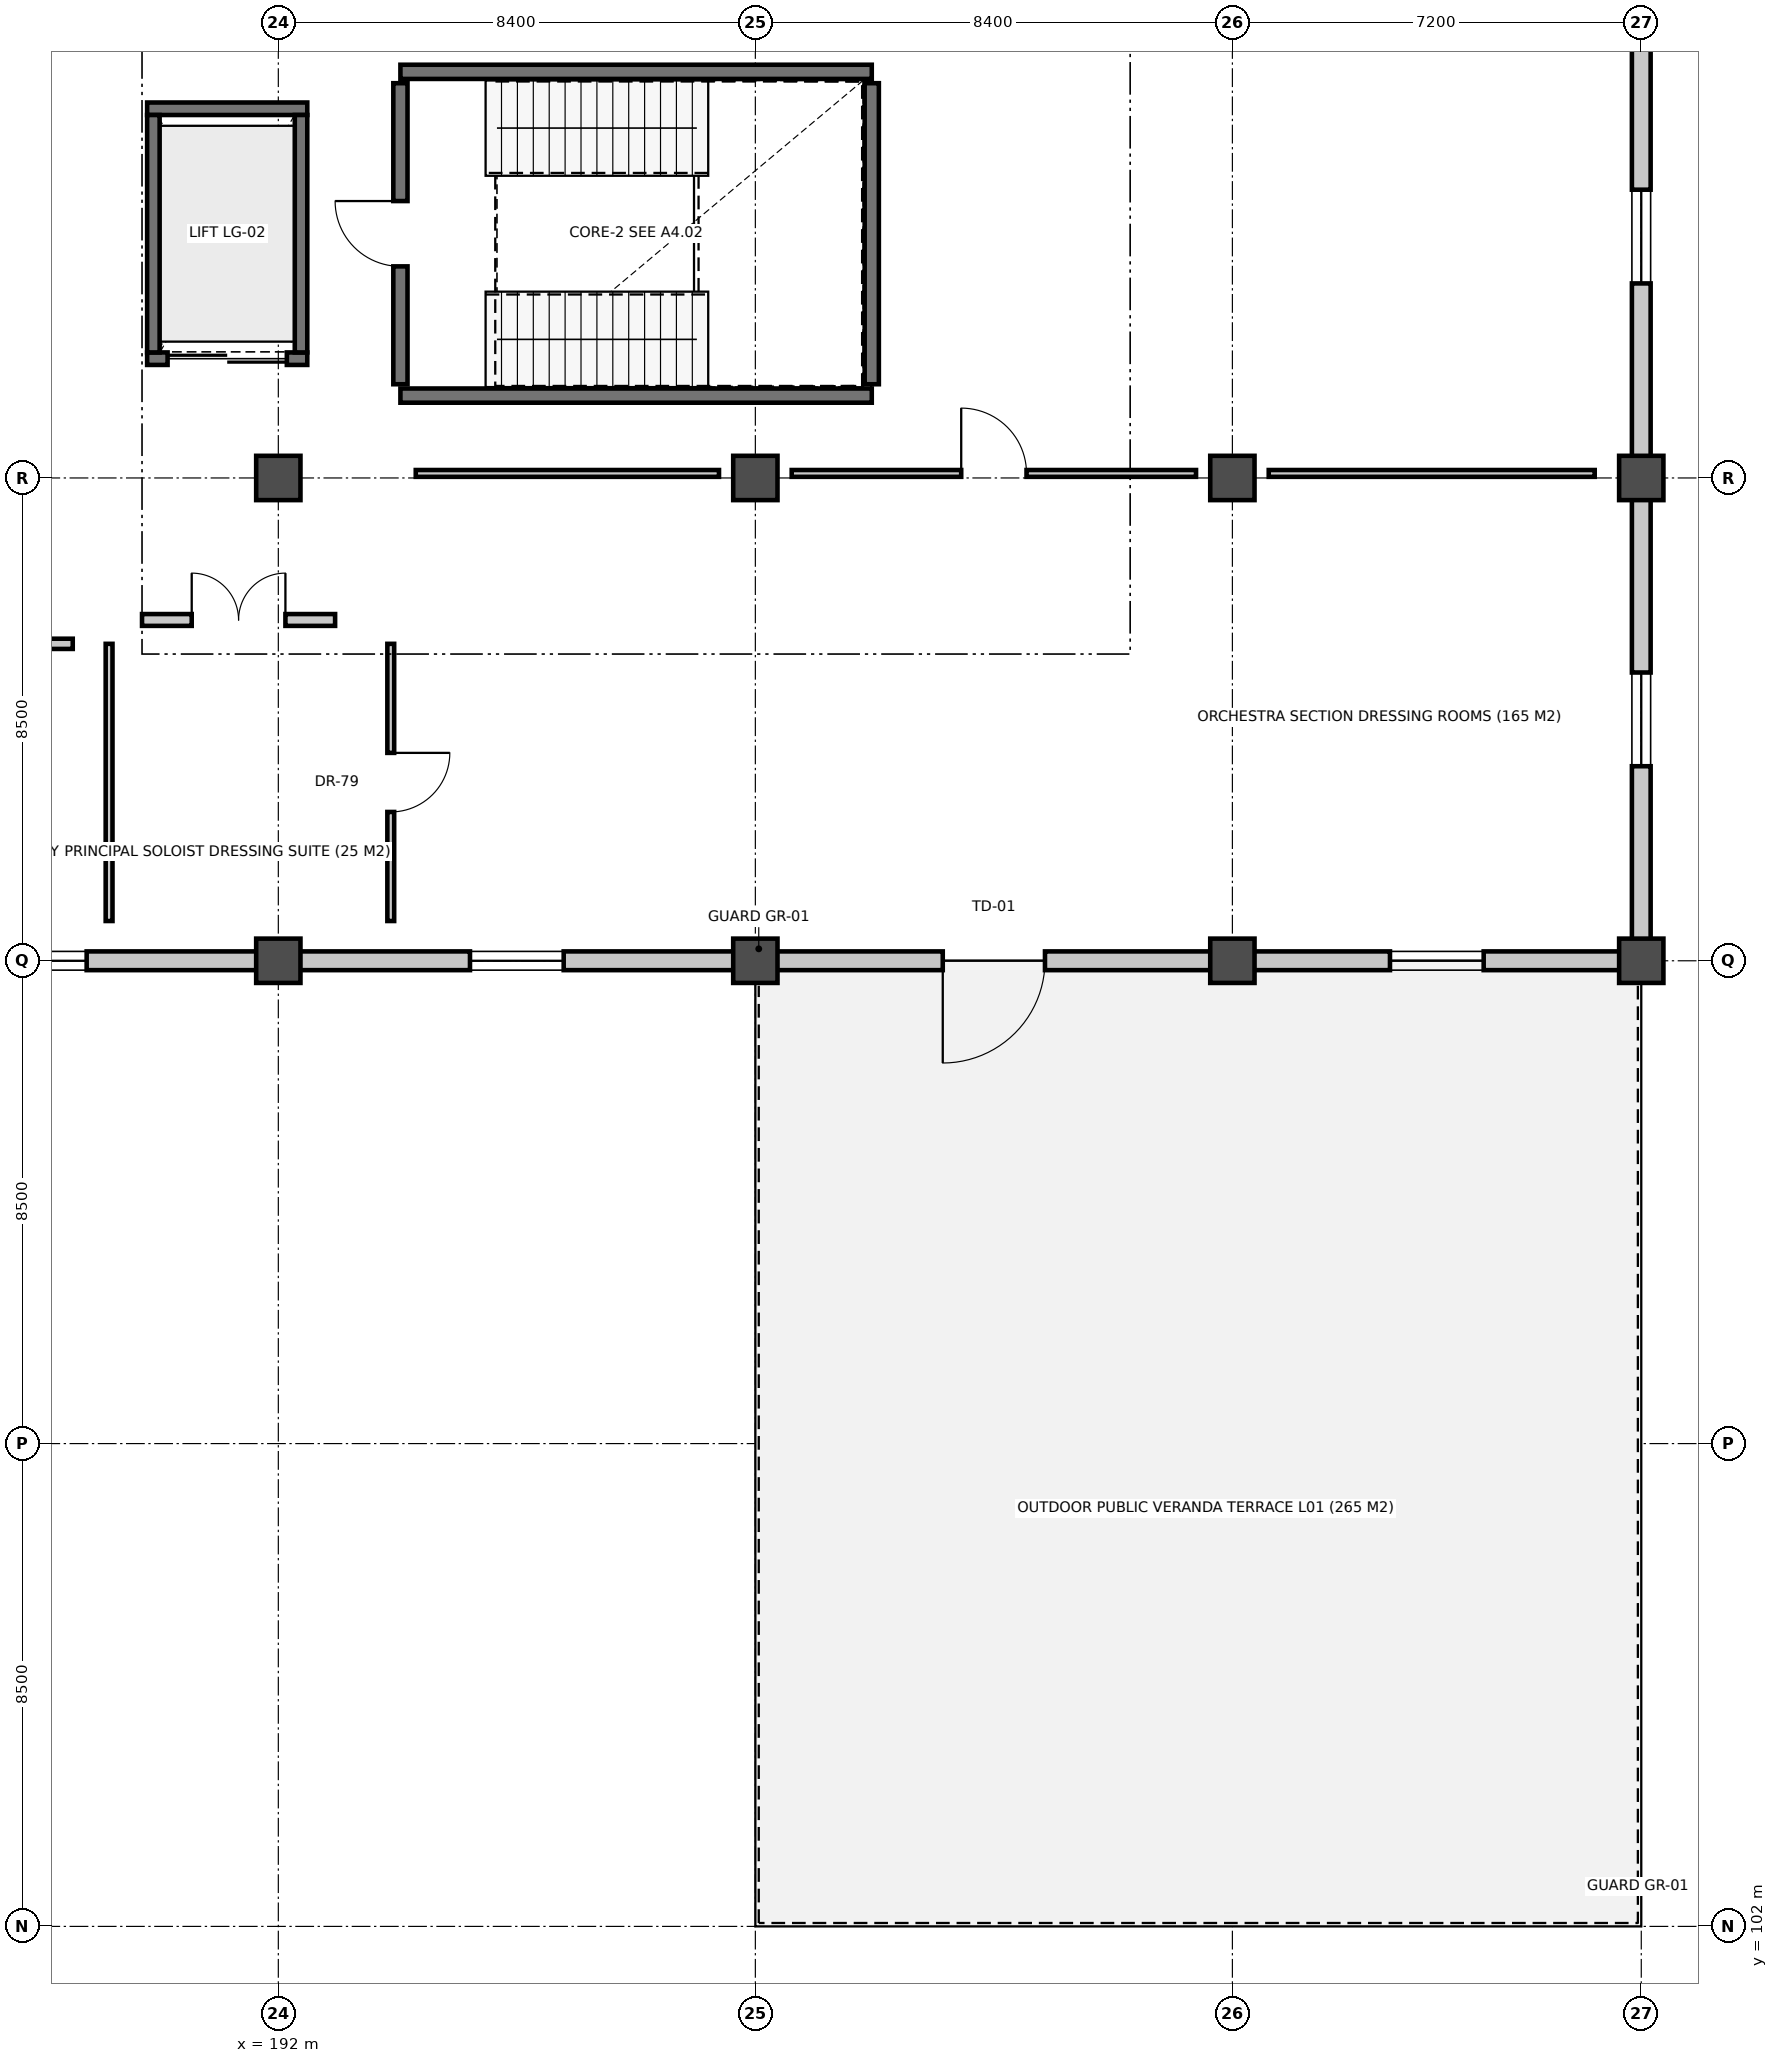
"""IFC4 building model, lengths in metres.
Left out: names, types, materials, properties, quantities, classifications, styles, units other than length and angle.
Written with IfcOpenShell. Run it as: python <this file> out.ifc"""

import sys

from ifc_helpers import new_model, si_unit, direction, frame, frame_2d, origin, origin_2d, place, context, subcontext, project, spatial, rectangle, extrude, element, fill, save


model = new_model("IFC4")
c1 = context("Model", 3, precision=1e-05, world=origin(), true_north=direction((0.0, 1.0)))
c2 = subcontext(c1, "Body", "Model", "MODEL_VIEW")
j1 = project(units=[si_unit("LENGTHUNIT", "METRE"), si_unit("PLANEANGLEUNIT", "RADIAN")], contexts=[c1])
p1 = place(None, origin())
s1 = spatial("IfcSite", under=j1, at=p1, CompositionType="ELEMENT")
p2 = place(p1, origin())
s2 = spatial("IfcBuilding", under=s1, at=p2, CompositionType="ELEMENT")
p3 = place(p2, frame((0.0, 0.0, 5.4)))
s3 = spatial("IfcBuildingStorey", under=s2, at=p3, CompositionType="ELEMENT", Elevation=5.4)
for number, where, z_axis, x_axis in (
    (1, (192.0, 119.0, 0.0), (0.0, 0.0, 1.0), (1.0, 0.0, 0.0)),
    (2, (192.0, 127.5, 0.0), (0.0, 0.0, 1.0), (1.0, 0.0, 0.0)),
    (3, (200.4, 119.0, 0.0), (0.0, 0.0, 1.0), (1.0, 0.0, 0.0)),
    (4, (200.4, 127.5, 0.0), (0.0, 0.0, 1.0), (1.0, 0.0, 0.0)),
    (5, (208.8, 119.0, 0.0), (0.0, 0.0, 1.0), (1.0, 0.0, 0.0)),
    (6, (208.8, 127.5, 0.0), (0.0, 0.0, 1.0), (1.0, 0.0, 0.0)),
    (7, (216.0, 119.0, 0.0), (0.0, 0.0, 1.0), (1.0, 0.0, 0.0)),
    (8, (216.0, 127.5, 0.0), (0.0, 0.0, 1.0), (1.0, 0.0, 0.0)),
):
    element("IfcColumn", number, at=place(p3, frame(where, z_axis=z_axis, x_axis=x_axis)), inside=s3, PredefinedType="COLUMN", context=c2, shape_type="SweptSolid", body=[
        extrude(rectangle(XDim=0.78, YDim=0.78, at=origin_2d()), origin(), (0.0, 0.0, 1.0), 4.8),
    ])
p4 = place(p3, frame((216.0, 127.13, 0.0), z_axis=(0.0, 0.0, 1.0), x_axis=(0.0, -1.0, 0.0)))
e9 = element("IfcWall", 9, at=p4, inside=s3, PredefinedType="SOLIDWALL", context=c2, shape_type="SweptSolid", body=[
    extrude(rectangle(XDim=7.76, YDim=0.33, at=frame_2d((3.88, 0.0))), origin(), (0.0, 0.0, 1.0), 3.594),
])
p5 = place(p4, frame((3.055, 0.0, 0.95)))
e10 = element("IfcOpeningElement", 10, at=p5, cuts=e9, PredefinedType="OPENING", context=c2, shape_type="SweptSolid", body=[
    extrude(rectangle(XDim=1.65, YDim=2.05, at=frame_2d((0.825, 1.025))), frame((0.0, 0.175, 0.0), z_axis=(0.0, -1.0, 0.0), x_axis=(1.0, 0.0, 0.0)), (0.0, 0.0, 1.0), 0.35),
])
p6 = place(p3, frame((216.0, 135.63, 0.0), z_axis=(0.0, 0.0, 1.0), x_axis=(0.0, -1.0, 0.0)))
e11 = element("IfcWall", 11, at=p6, inside=s3, PredefinedType="SOLIDWALL", context=c2, shape_type="SweptSolid", body=[
    extrude(rectangle(XDim=7.76, YDim=0.33, at=frame_2d((3.88, 0.0))), origin(), (0.0, 0.0, 1.0), 3.906),
])
p7 = place(p6, frame((3.055, 0.0, 0.95)))
e12 = element("IfcOpeningElement", 12, at=p7, cuts=e11, PredefinedType="OPENING", context=c2, shape_type="SweptSolid", body=[
    extrude(rectangle(XDim=1.65, YDim=2.05, at=frame_2d((0.825, 1.025))), frame((0.0, 0.175, 0.0), z_axis=(0.0, -1.0, 0.0), x_axis=(1.0, 0.0, 0.0)), (0.0, 0.0, 1.0), 0.35),
])
p8 = place(p3, frame((191.63, 119.0, 0.0), z_axis=(0.0, 0.0, 1.0), x_axis=(-1.0, 0.0, 0.0)))
e13 = element("IfcWall", 13, at=p8, inside=s3, PredefinedType="SOLIDWALL", context=c2, shape_type="SweptSolid", body=[
    extrude(rectangle(XDim=7.66, YDim=0.33, at=frame_2d((3.83, 0.0))), origin(), (0.0, 0.0, 1.0), 3.906),
])
p9 = place(p8, frame((3.005, 0.0, 0.95)))
e14 = element("IfcOpeningElement", 14, at=p9, cuts=e13, PredefinedType="OPENING", context=c2, shape_type="SweptSolid", body=[
    extrude(rectangle(XDim=1.65, YDim=2.05, at=frame_2d((0.825, 1.025))), frame((0.0, 0.175, 0.0), z_axis=(0.0, -1.0, 0.0), x_axis=(1.0, 0.0, 0.0)), (0.0, 0.0, 1.0), 0.35),
])
p10 = place(p3, frame((200.03, 119.0, 0.0), z_axis=(0.0, 0.0, 1.0), x_axis=(-1.0, 0.0, 0.0)))
e15 = element("IfcWall", 15, at=p10, inside=s3, PredefinedType="SOLIDWALL", context=c2, shape_type="SweptSolid", body=[
    extrude(rectangle(XDim=7.66, YDim=0.33, at=frame_2d((3.83, 0.0))), origin(), (0.0, 0.0, 1.0), 3.734),
])
p11 = place(p10, frame((3.005, 0.0, 0.95)))
e16 = element("IfcOpeningElement", 16, at=p11, cuts=e15, PredefinedType="OPENING", context=c2, shape_type="SweptSolid", body=[
    extrude(rectangle(XDim=1.65, YDim=2.05, at=frame_2d((0.825, 1.025))), frame((0.0, 0.175, 0.0), z_axis=(0.0, -1.0, 0.0), x_axis=(1.0, 0.0, 0.0)), (0.0, 0.0, 1.0), 0.35),
])
p12 = place(p3, frame((208.43, 119.0, 0.0), z_axis=(0.0, 0.0, 1.0), x_axis=(-1.0, 0.0, 0.0)))
e17 = element("IfcWall", 17, at=p12, inside=s3, PredefinedType="SOLIDWALL", context=c2, shape_type="SweptSolid", body=[
    extrude(rectangle(XDim=7.66, YDim=0.33, at=frame_2d((3.83, 0.0))), origin(), (0.0, 0.0, 1.0), 3.821),
])
p13 = place(p12, frame((2.93, 0.0, 0.0)))
e18 = element("IfcOpeningElement", 18, at=p13, cuts=e17, PredefinedType="OPENING", context=c2, shape_type="SweptSolid", body=[
    extrude(rectangle(XDim=1.8, YDim=2.35, at=frame_2d((0.9, 1.175))), frame((0.0, 0.175, 0.0), z_axis=(0.0, -1.0, 0.0), x_axis=(1.0, 0.0, 0.0)), (0.0, 0.0, 1.0), 0.35),
])
p14 = place(p3, frame((215.63, 119.0, 0.0), z_axis=(0.0, 0.0, 1.0), x_axis=(-1.0, 0.0, 0.0)))
e19 = element("IfcWall", 19, at=p14, inside=s3, PredefinedType="SOLIDWALL", context=c2, shape_type="SweptSolid", body=[
    extrude(rectangle(XDim=6.46, YDim=0.33, at=frame_2d((3.23, 0.0))), origin(), (0.0, 0.0, 1.0), 3.744),
])
p15 = place(p14, frame((2.405, 0.0, 0.95)))
e20 = element("IfcOpeningElement", 20, at=p15, cuts=e19, PredefinedType="OPENING", context=c2, shape_type="SweptSolid", body=[
    extrude(rectangle(XDim=1.65, YDim=2.05, at=frame_2d((0.825, 1.025))), frame((0.0, 0.175, 0.0), z_axis=(0.0, -1.0, 0.0), x_axis=(1.0, 0.0, 0.0)), (0.0, 0.0, 1.0), 0.35),
])
for number, where, z_axis, x_axis in (
    (21, (202.45, 128.95, 0.0), (0.0, 0.0, 1.0), (-1.0, 0.0, 0.0)),
    (22, (194.15, 134.65, 0.0), (0.0, 0.0, 1.0), (1.0, 0.0, 0.0)),
):
    element("IfcWall", number, at=place(p3, frame(where, z_axis=z_axis, x_axis=x_axis)), inside=s3, PredefinedType="SHEAR", context=c2, shape_type="SweptSolid", body=[
        extrude(rectangle(XDim=8.3, YDim=0.25, at=frame_2d((4.15, 0.0))), origin(), (0.0, 0.0, 1.0), 4.53),
    ])
p16 = place(p3, frame((194.15, 129.15, 0.0), z_axis=(0.0, 0.0, 1.0), x_axis=(0.0, 1.0, 0.0)))
e23 = element("IfcWall", 23, at=p16, inside=s3, PredefinedType="SHEAR", context=c2, shape_type="SweptSolid", body=[
    extrude(rectangle(XDim=5.3, YDim=0.25, at=frame_2d((2.65, 0.0))), origin(), (0.0, 0.0, 1.0), 4.53),
])
p17 = place(p16, frame((2.075, 0.0, 0.0)))
e24 = element("IfcOpeningElement", 24, at=p17, cuts=e23, PredefinedType="OPENING", context=c2, shape_type="SweptSolid", body=[
    extrude(rectangle(XDim=1.15, YDim=2.18, at=frame_2d((0.575, 1.09))), frame((0.0, 0.135, 0.0), z_axis=(0.0, -1.0, 0.0), x_axis=(1.0, 0.0, 0.0)), (0.0, 0.0, 1.0), 0.27),
])
p18 = place(p3, frame((202.45, 134.45, 0.0), z_axis=(0.0, 0.0, 1.0), x_axis=(0.0, -1.0, 0.0)))
e25 = element("IfcWall", 25, at=p18, inside=s3, PredefinedType="SHEAR", context=c2, shape_type="SweptSolid", body=[
    extrude(rectangle(XDim=5.3, YDim=0.25, at=frame_2d((2.65, 0.0))), origin(), (0.0, 0.0, 1.0), 4.53),
])
p19 = place(p3, frame((189.69, 129.6, 0.0), z_axis=(0.0, 0.0, 1.0), x_axis=(1.0, 0.0, 0.0)))
e26 = element("IfcWall", 26, at=p19, inside=s3, PredefinedType="SHEAR", context=c2, shape_type="SweptSolid", body=[
    extrude(rectangle(XDim=2.82, YDim=0.22, at=frame_2d((1.41, 0.0))), origin(), (0.0, 0.0, 1.0), 3.587),
])
p20 = place(p19, frame((0.36, 0.0, 0.0)))
e27 = element("IfcOpeningElement", 27, at=p20, cuts=e26, PredefinedType="OPENING", context=c2, shape_type="SweptSolid", body=[
    extrude(rectangle(XDim=2.1, YDim=2.45, at=frame_2d((1.05, 1.225))), frame((0.0, 0.12, 0.0), z_axis=(0.0, -1.0, 0.0), x_axis=(1.0, 0.0, 0.0)), (0.0, 0.0, 1.0), 0.24),
])
p21 = place(p3, frame((189.69, 134.0, 0.0), z_axis=(0.0, 0.0, 1.0), x_axis=(1.0, 0.0, 0.0)))
e28 = element("IfcWall", 28, at=p21, inside=s3, PredefinedType="SHEAR", context=c2, shape_type="SweptSolid", body=[
    extrude(rectangle(XDim=2.82, YDim=0.22, at=frame_2d((1.41, 0.0))), origin(), (0.0, 0.0, 1.0), 3.587),
])
p22 = place(p3, frame((189.8, 129.71, 0.0), z_axis=(0.0, 0.0, 1.0), x_axis=(0.0, 1.0, 0.0)))
e29 = element("IfcWall", 29, at=p22, inside=s3, PredefinedType="SHEAR", context=c2, shape_type="SweptSolid", body=[
    extrude(rectangle(XDim=4.18, YDim=0.22, at=frame_2d((2.09, 0.0))), origin(), (0.0, 0.0, 1.0), 4.53),
])
p23 = place(p3, frame((192.4, 129.71, 0.0), z_axis=(0.0, 0.0, 1.0), x_axis=(0.0, 1.0, 0.0)))
e30 = element("IfcWall", 30, at=p23, inside=s3, PredefinedType="SHEAR", context=c2, shape_type="SweptSolid", body=[
    extrude(rectangle(XDim=4.18, YDim=0.22, at=frame_2d((2.09, 0.0))), origin(), (0.0, 0.0, 1.0), 3.587),
])
p24 = place(p3, frame((189.6, 125.0, 0.0), z_axis=(0.0, 0.0, 1.0), x_axis=(1.0, 0.0, 0.0)))
e31 = element("IfcWall", 31, at=p24, inside=s3, PredefinedType="PARTITIONING", context=c2, shape_type="SweptSolid", body=[
    extrude(rectangle(XDim=3.4, YDim=0.208, at=frame_2d((1.7, 0.0))), origin(), (0.0, 0.0, 1.0), 3.655),
])
p25 = place(p24, frame((0.875, 0.0, 0.0)))
e32 = element("IfcOpeningElement", 32, at=p25, cuts=e31, PredefinedType="OPENING", context=c2, shape_type="SweptSolid", body=[
    extrude(rectangle(XDim=1.65, YDim=2.2, at=frame_2d((0.825, 1.1))), frame((0.0, 0.114, 0.0), z_axis=(0.0, -1.0, 0.0), x_axis=(1.0, 0.0, 0.0)), (0.0, 0.0, 1.0), 0.228),
])
p26 = place(p3, frame((193.98, 124.58, 0.0), z_axis=(0.0, 0.0, 1.0), x_axis=(0.0, -1.0, 0.0)))
e33 = element("IfcWall", 33, at=p26, inside=s3, PredefinedType="PARTITIONING", context=c2, shape_type="SweptSolid", body=[
    extrude(rectangle(XDim=4.88, YDim=0.12, at=frame_2d((2.44, 0.0))), origin(), (0.0, 0.0, 1.0), 3.45),
])
p27 = place(p26, frame((1.92, 0.0, 0.0)))
e34 = element("IfcOpeningElement", 34, at=p27, cuts=e33, PredefinedType="OPENING", context=c2, shape_type="SweptSolid", body=[
    extrude(rectangle(XDim=1.04, YDim=2.2, at=frame_2d((0.52, 1.1))), frame((0.0, 0.07, 0.0), z_axis=(0.0, -1.0, 0.0), x_axis=(1.0, 0.0, 0.0)), (0.0, 0.0, 1.0), 0.14),
])
p28 = place(p3, frame((189.02, 119.7, 0.0), z_axis=(0.0, 0.0, 1.0), x_axis=(0.0, 1.0, 0.0)))
e35 = element("IfcWall", 35, at=p28, inside=s3, PredefinedType="PARTITIONING", context=c2, shape_type="SweptSolid", body=[
    extrude(rectangle(XDim=4.88, YDim=0.12, at=frame_2d((2.44, 0.0))), origin(), (0.0, 0.0, 1.0), 3.45),
])
p29 = place(p3, frame((177.861, 124.58, 0.0), z_axis=(0.0, 0.0, 1.0), x_axis=(1.0, 0.0, 0.0)))
e36 = element("IfcWall", 36, at=p29, inside=s3, PredefinedType="PARTITIONING", context=c2, shape_type="SweptSolid", body=[
    extrude(rectangle(XDim=10.519, YDim=0.18, at=frame_2d((5.26, 0.0))), origin(), (0.0, 0.0, 1.0), 3.45),
])
p30 = place(p3, frame((194.42, 127.58, 0.0), z_axis=(0.0, 0.0, 1.0), x_axis=(1.0, 0.0, 0.0)))
e37 = element("IfcWall", 37, at=p30, inside=s3, PredefinedType="PARTITIONING", context=c2, shape_type="SweptSolid", body=[
    extrude(rectangle(XDim=5.34, YDim=0.12, at=frame_2d((2.67, 0.0))), origin(), (0.0, 0.0, 1.0), 3.45),
])
p31 = place(p3, frame((201.04, 127.58, 0.0), z_axis=(0.0, 0.0, 1.0), x_axis=(1.0, 0.0, 0.0)))
e38 = element("IfcWall", 38, at=p31, inside=s3, PredefinedType="PARTITIONING", context=c2, shape_type="SweptSolid", body=[
    extrude(rectangle(XDim=7.12, YDim=0.12, at=frame_2d((3.56, 0.0))), origin(), (0.0, 0.0, 1.0), 3.45),
])
p32 = place(p31, frame((2.985, 0.0, 0.0)))
e39 = element("IfcOpeningElement", 39, at=p32, cuts=e38, PredefinedType="OPENING", context=c2, shape_type="SweptSolid", body=[
    extrude(rectangle(XDim=1.15, YDim=2.24, at=frame_2d((0.575, 1.12))), frame((0.0, 0.07, 0.0), z_axis=(0.0, -1.0, 0.0), x_axis=(1.0, 0.0, 0.0)), (0.0, 0.0, 1.0), 0.14),
])
p33 = place(p3, frame((209.44, 127.58, 0.0), z_axis=(0.0, 0.0, 1.0), x_axis=(1.0, 0.0, 0.0)))
e40 = element("IfcWall", 40, at=p33, inside=s3, PredefinedType="PARTITIONING", context=c2, shape_type="SweptSolid", body=[
    extrude(rectangle(XDim=5.74, YDim=0.12, at=frame_2d((2.87, 0.0))), origin(), (0.0, 0.0, 1.0), 3.45),
])
p34 = place(p5, origin())
e41 = element("IfcWindow", 41, at=p34, inside=s3, PartitioningType="SINGLE_PANEL", PredefinedType="WINDOW", context=c2, shape_type="SweptSolid", body=[
    extrude(rectangle(XDim=1.65, YDim=2.05, at=frame_2d((0.825, 1.025))), frame((0.0, 0.03, 0.0), z_axis=(0.0, -1.0, 0.0), x_axis=(1.0, 0.0, 0.0)), (0.0, 0.0, 1.0), 0.06),
])
fill(e10, e41)
p35 = place(p7, origin())
e42 = element("IfcWindow", 42, at=p35, inside=s3, PartitioningType="SINGLE_PANEL", PredefinedType="WINDOW", context=c2, shape_type="SweptSolid", body=[
    extrude(rectangle(XDim=1.65, YDim=2.05, at=frame_2d((0.825, 1.025))), frame((0.0, 0.03, 0.0), z_axis=(0.0, -1.0, 0.0), x_axis=(1.0, 0.0, 0.0)), (0.0, 0.0, 1.0), 0.06),
])
fill(e12, e42)
p36 = place(p9, origin())
e43 = element("IfcWindow", 43, at=p36, inside=s3, PartitioningType="SINGLE_PANEL", PredefinedType="WINDOW", context=c2, shape_type="SweptSolid", body=[
    extrude(rectangle(XDim=1.65, YDim=2.05, at=frame_2d((0.825, 1.025))), frame((0.0, 0.03, 0.0), z_axis=(0.0, -1.0, 0.0), x_axis=(1.0, 0.0, 0.0)), (0.0, 0.0, 1.0), 0.06),
])
fill(e14, e43)
p37 = place(p11, origin())
e44 = element("IfcWindow", 44, at=p37, inside=s3, PartitioningType="SINGLE_PANEL", PredefinedType="WINDOW", context=c2, shape_type="SweptSolid", body=[
    extrude(rectangle(XDim=1.65, YDim=2.05, at=frame_2d((0.825, 1.025))), frame((0.0, 0.03, 0.0), z_axis=(0.0, -1.0, 0.0), x_axis=(1.0, 0.0, 0.0)), (0.0, 0.0, 1.0), 0.06),
])
fill(e16, e44)
p38 = place(p13, origin())
e45 = element("IfcDoor", 45, at=p38, inside=s3, OperationType="SINGLE_SWING_RIGHT", PredefinedType="DOOR", context=c2, shape_type="SweptSolid", body=[
    extrude(rectangle(XDim=1.8, YDim=2.35, at=frame_2d((0.9, 1.175))), frame((0.0, 0.025, 0.0), z_axis=(0.0, -1.0, 0.0), x_axis=(1.0, 0.0, 0.0)), (0.0, 0.0, 1.0), 0.05),
])
fill(e18, e45)
p39 = place(p15, origin())
e46 = element("IfcWindow", 46, at=p39, inside=s3, PartitioningType="SINGLE_PANEL", PredefinedType="WINDOW", context=c2, shape_type="SweptSolid", body=[
    extrude(rectangle(XDim=1.65, YDim=2.05, at=frame_2d((0.825, 1.025))), frame((0.0, 0.03, 0.0), z_axis=(0.0, -1.0, 0.0), x_axis=(1.0, 0.0, 0.0)), (0.0, 0.0, 1.0), 0.06),
])
fill(e20, e46)
p40 = place(p17, origin())
e47 = element("IfcDoor", 47, at=p40, inside=s3, OperationType="SINGLE_SWING_RIGHT", PredefinedType="DOOR", context=c2, shape_type="SweptSolid", body=[
    extrude(rectangle(XDim=1.15, YDim=2.18, at=frame_2d((0.575, 1.09))), frame((0.0, 0.025, 0.0), z_axis=(0.0, -1.0, 0.0), x_axis=(1.0, 0.0, 0.0)), (0.0, 0.0, 1.0), 0.05),
])
fill(e24, e47)
p41 = place(p20, origin())
e48 = element("IfcDoor", 48, at=p41, inside=s3, OperationType="DOUBLE_DOOR_SLIDING", PredefinedType="DOOR", context=c2, shape_type="SweptSolid", body=[
    extrude(rectangle(XDim=2.1, YDim=2.45, at=frame_2d((1.05, 1.225))), frame((0.0, 0.025, 0.0), z_axis=(0.0, -1.0, 0.0), x_axis=(1.0, 0.0, 0.0)), (0.0, 0.0, 1.0), 0.05),
])
fill(e27, e48)
p42 = place(p25, origin())
e49 = element("IfcDoor", 49, at=p42, inside=s3, OperationType="DOUBLE_DOOR_SINGLE_SWING", PredefinedType="DOOR", context=c2, shape_type="SweptSolid", body=[
    extrude(rectangle(XDim=1.65, YDim=2.2, at=frame_2d((0.825, 1.1))), frame((0.0, 0.025, 0.0), z_axis=(0.0, -1.0, 0.0), x_axis=(1.0, 0.0, 0.0)), (0.0, 0.0, 1.0), 0.05),
])
fill(e32, e49)
p43 = place(p27, origin())
e50 = element("IfcDoor", 50, at=p43, inside=s3, OperationType="SINGLE_SWING_LEFT", PredefinedType="DOOR", context=c2, shape_type="SweptSolid", body=[
    extrude(rectangle(XDim=1.04, YDim=2.2, at=frame_2d((0.52, 1.1))), frame((0.0, 0.025, 0.0), z_axis=(0.0, -1.0, 0.0), x_axis=(1.0, 0.0, 0.0)), (0.0, 0.0, 1.0), 0.05),
])
fill(e34, e50)
p44 = place(p32, origin())
e51 = element("IfcDoor", 51, at=p44, inside=s3, OperationType="SINGLE_SWING_LEFT", PredefinedType="DOOR", context=c2, shape_type="SweptSolid", body=[
    extrude(rectangle(XDim=1.15, YDim=2.24, at=frame_2d((0.575, 1.12))), frame((0.0, 0.025, 0.0), z_axis=(0.0, -1.0, 0.0), x_axis=(1.0, 0.0, 0.0)), (0.0, 0.0, 1.0), 0.05),
])
fill(e39, e51)
save(model, sys.argv[1])
